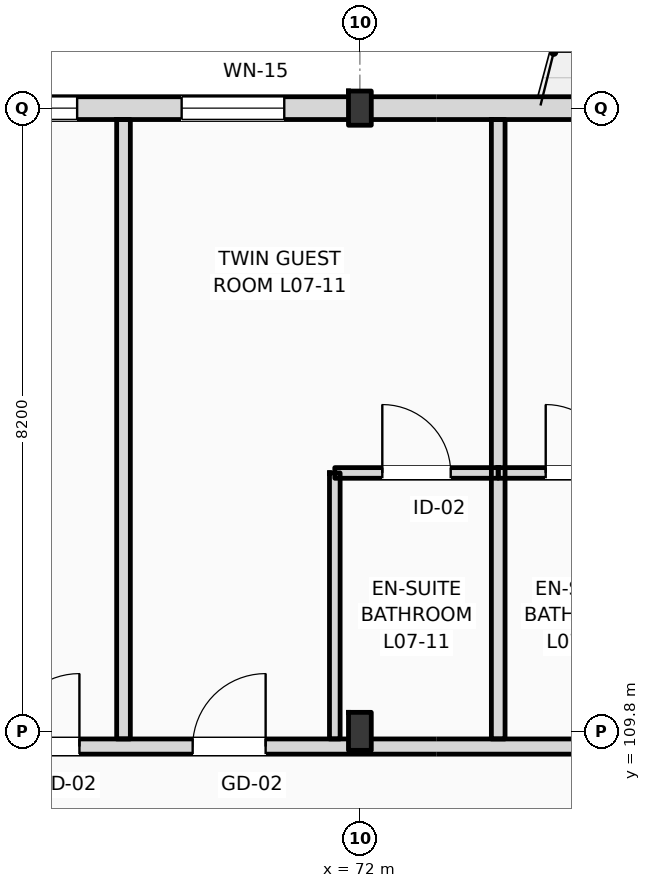
"""IFC4 building model, lengths in metres.
Left out: names, types, materials, properties, quantities, classifications, styles, units other than length and angle.
Written with IfcOpenShell. Run it as: python <this file> out.ifc"""

import sys

from ifc_helpers import new_model, si_unit, direction, frame, frame_2d, origin, origin_2d, place, context, subcontext, project, spatial, rectangle, i_section, extrude, element, fill, save


model = new_model("IFC4")
c1 = context("Model", 3, precision=1e-05, world=origin(), true_north=direction((0.0, 1.0)))
c2 = subcontext(c1, "Body", "Model", "MODEL_VIEW")
j1 = project(units=[si_unit("LENGTHUNIT", "METRE"), si_unit("PLANEANGLEUNIT", "RADIAN")], contexts=[c1])
p1 = place(None, origin())
s1 = spatial("IfcSite", under=j1, at=p1, CompositionType="ELEMENT")
p2 = place(p1, origin())
s2 = spatial("IfcBuilding", under=s1, at=p2, CompositionType="ELEMENT")
p3 = place(p2, frame((0.0, 0.0, 31.8)))
s3 = spatial("IfcBuildingStorey", under=s2, at=p3, CompositionType="ELEMENT", Elevation=31.8)
p4 = place(p3, frame((72.0, 109.8, 0.0), z_axis=(0.0, 0.0, 1.0), x_axis=(1.0, 0.0, 0.0)))
e1 = element("IfcColumn", 1, at=p4, inside=s3, PredefinedType="COLUMN", context=c2, shape_type="SweptSolid", body=[
    extrude(i_section(OverallWidth=0.3, OverallDepth=0.5, WebThickness=0.014, FlangeThickness=0.028, FilletRadius=0.027, at=origin_2d()), origin(), (0.0, 0.0, 1.0), 3.6),
])
p5 = place(p3, frame((72.0, 118.0, 0.0), z_axis=(0.0, 0.0, 1.0), x_axis=(1.0, 0.0, 0.0)))
e2 = element("IfcColumn", 2, at=p5, inside=s3, PredefinedType="COLUMN", context=c2, shape_type="SweptSolid", body=[
    extrude(i_section(OverallWidth=0.3, OverallDepth=0.45, WebThickness=0.014, FlangeThickness=0.026, FilletRadius=0.027, at=origin_2d()), origin(), (0.0, 0.0, 1.0), 3.6),
])
p6 = place(p3, frame((22.5, 118.0, 0.0), z_axis=(0.0, 0.0, 1.0), x_axis=(1.0, 0.0, 0.0)))
e3 = element("IfcWall", 3, at=p6, inside=s3, PredefinedType="STANDARD", context=c2, shape_type="SweptSolid", body=[
    extrude(rectangle(XDim=97.5, YDim=0.3, at=frame_2d((48.75, 0.0))), origin(), (0.0, 0.0, 1.0), 2.72),
])
p7 = place(p6, frame((3.61, 0.0, 0.9)))
e4 = element("IfcOpeningElement", 4, at=p7, cuts=e3, PredefinedType="OPENING", context=c2, shape_type="SweptSolid", body=[
    extrude(rectangle(XDim=1.1, YDim=1.64, at=frame_2d((0.55, 0.82))), frame((0.0, 0.16, 0.0), z_axis=(0.0, -1.0, 0.0), x_axis=(1.0, 0.0, 0.0)), (0.0, 0.0, 1.0), 0.32),
])
p8 = place(p6, frame((6.855, 0.0, 0.0)))
e5 = element("IfcOpeningElement", 5, at=p8, cuts=e3, PredefinedType="OPENING", context=c2, shape_type="SweptSolid", body=[
    extrude(rectangle(XDim=1.2, YDim=2.25, at=frame_2d((0.6, 1.125))), frame((0.0, 0.16, 0.0), z_axis=(0.0, -1.0, 0.0), x_axis=(1.0, 0.0, 0.0)), (0.0, 0.0, 1.0), 0.32),
])
p9 = place(p6, frame((11.405, 0.0, 0.9)))
e6 = element("IfcOpeningElement", 6, at=p9, cuts=e3, PredefinedType="OPENING", context=c2, shape_type="SweptSolid", body=[
    extrude(rectangle(XDim=2.1, YDim=1.64, at=frame_2d((1.05, 0.82))), frame((0.0, 0.16, 0.0), z_axis=(0.0, -1.0, 0.0), x_axis=(1.0, 0.0, 0.0)), (0.0, 0.0, 1.0), 0.32),
])
p10 = place(p6, frame((15.13, 0.0, 0.9)))
e7 = element("IfcOpeningElement", 7, at=p10, cuts=e3, PredefinedType="OPENING", context=c2, shape_type="SweptSolid", body=[
    extrude(rectangle(XDim=2.25, YDim=1.64, at=frame_2d((1.125, 0.82))), frame((0.0, 0.16, 0.0), z_axis=(0.0, -1.0, 0.0), x_axis=(1.0, 0.0, 0.0)), (0.0, 0.0, 1.0), 0.32),
])
p11 = place(p6, frame((21.53, 0.0, 0.0)))
e8 = element("IfcOpeningElement", 8, at=p11, cuts=e3, PredefinedType="OPENING", context=c2, shape_type="SweptSolid", body=[
    extrude(rectangle(XDim=1.2, YDim=2.25, at=frame_2d((0.6, 1.125))), frame((0.0, 0.16, 0.0), z_axis=(0.0, -1.0, 0.0), x_axis=(1.0, 0.0, 0.0)), (0.0, 0.0, 1.0), 0.32),
])
p12 = place(p6, frame((24.18, 0.0, 0.9)))
e9 = element("IfcOpeningElement", 9, at=p12, cuts=e3, PredefinedType="OPENING", context=c2, shape_type="SweptSolid", body=[
    extrude(rectangle(XDim=1.1, YDim=1.64, at=frame_2d((0.55, 0.82))), frame((0.0, 0.16, 0.0), z_axis=(0.0, -1.0, 0.0), x_axis=(1.0, 0.0, 0.0)), (0.0, 0.0, 1.0), 0.32),
])
p13 = place(p6, frame((29.105, 0.0, 0.9)))
e10 = element("IfcOpeningElement", 10, at=p13, cuts=e3, PredefinedType="OPENING", context=c2, shape_type="SweptSolid", body=[
    extrude(rectangle(XDim=2.7, YDim=1.64, at=frame_2d((1.35, 0.82))), frame((0.0, 0.16, 0.0), z_axis=(0.0, -1.0, 0.0), x_axis=(1.0, 0.0, 0.0)), (0.0, 0.0, 1.0), 0.32),
])
p14 = place(p6, frame((34.83, 0.0, 0.9)))
e11 = element("IfcOpeningElement", 11, at=p14, cuts=e3, PredefinedType="OPENING", context=c2, shape_type="SweptSolid", body=[
    extrude(rectangle(XDim=1.8, YDim=1.64, at=frame_2d((0.9, 0.82))), frame((0.0, 0.16, 0.0), z_axis=(0.0, -1.0, 0.0), x_axis=(1.0, 0.0, 0.0)), (0.0, 0.0, 1.0), 0.32),
])
p15 = place(p6, frame((38.525, 0.0, 0.0)))
e12 = element("IfcOpeningElement", 12, at=p15, cuts=e3, PredefinedType="OPENING", context=c2, shape_type="SweptSolid", body=[
    extrude(rectangle(XDim=1.2, YDim=2.25, at=frame_2d((0.6, 1.125))), frame((0.0, 0.16, 0.0), z_axis=(0.0, -1.0, 0.0), x_axis=(1.0, 0.0, 0.0)), (0.0, 0.0, 1.0), 0.32),
])
p16 = place(p6, frame((42.73, 0.0, 0.9)))
e13 = element("IfcOpeningElement", 13, at=p16, cuts=e3, PredefinedType="OPENING", context=c2, shape_type="SweptSolid", body=[
    extrude(rectangle(XDim=3.05, YDim=1.64, at=frame_2d((1.525, 0.82))), frame((0.0, 0.16, 0.0), z_axis=(0.0, -1.0, 0.0), x_axis=(1.0, 0.0, 0.0)), (0.0, 0.0, 1.0), 0.32),
])
p17 = place(p6, frame((47.155, 0.0, 0.9)))
e14 = element("IfcOpeningElement", 14, at=p17, cuts=e3, PredefinedType="OPENING", context=c2, shape_type="SweptSolid", body=[
    extrude(rectangle(XDim=1.35, YDim=1.64, at=frame_2d((0.675, 0.82))), frame((0.0, 0.16, 0.0), z_axis=(0.0, -1.0, 0.0), x_axis=(1.0, 0.0, 0.0)), (0.0, 0.0, 1.0), 0.32),
])
p18 = place(p6, frame((53.065, 0.0, 0.0)))
e15 = element("IfcOpeningElement", 15, at=p18, cuts=e3, PredefinedType="OPENING", context=c2, shape_type="SweptSolid", body=[
    extrude(rectangle(XDim=1.2, YDim=2.25, at=frame_2d((0.6, 1.125))), frame((0.0, 0.16, 0.0), z_axis=(0.0, -1.0, 0.0), x_axis=(1.0, 0.0, 0.0)), (0.0, 0.0, 1.0), 0.32),
])
p19 = place(p6, frame((58.2, 0.0, 0.9)))
e16 = element("IfcOpeningElement", 16, at=p19, cuts=e3, PredefinedType="OPENING", context=c2, shape_type="SweptSolid", body=[
    extrude(rectangle(XDim=1.8, YDim=1.64, at=frame_2d((0.9, 0.82))), frame((0.0, 0.16, 0.0), z_axis=(0.0, -1.0, 0.0), x_axis=(1.0, 0.0, 0.0)), (0.0, 0.0, 1.0), 0.32),
])
p20 = place(p6, frame((61.13, 0.0, 0.9)))
e17 = element("IfcOpeningElement", 17, at=p20, cuts=e3, PredefinedType="OPENING", context=c2, shape_type="SweptSolid", body=[
    extrude(rectangle(XDim=3.05, YDim=1.64, at=frame_2d((1.525, 0.82))), frame((0.0, 0.16, 0.0), z_axis=(0.0, -1.0, 0.0), x_axis=(1.0, 0.0, 0.0)), (0.0, 0.0, 1.0), 0.32),
])
p21 = place(p6, frame((67.93, 0.0, 0.0)))
e18 = element("IfcOpeningElement", 18, at=p21, cuts=e3, PredefinedType="OPENING", context=c2, shape_type="SweptSolid", body=[
    extrude(rectangle(XDim=1.2, YDim=2.25, at=frame_2d((0.6, 1.125))), frame((0.0, 0.16, 0.0), z_axis=(0.0, -1.0, 0.0), x_axis=(1.0, 0.0, 0.0)), (0.0, 0.0, 1.0), 0.32),
])
p22 = place(p6, frame((70.39, 0.0, 0.0)))
e19 = element("IfcOpeningElement", 19, at=p22, cuts=e3, PredefinedType="OPENING", context=c2, shape_type="SweptSolid", body=[
    extrude(rectangle(XDim=1.2, YDim=2.25, at=frame_2d((0.6, 1.125))), frame((0.0, 0.16, 0.0), z_axis=(0.0, -1.0, 0.0), x_axis=(1.0, 0.0, 0.0)), (0.0, 0.0, 1.0), 0.32),
])
p23 = place(p6, frame((75.905, 0.0, 0.9)))
e20 = element("IfcOpeningElement", 20, at=p23, cuts=e3, PredefinedType="OPENING", context=c2, shape_type="SweptSolid", body=[
    extrude(rectangle(XDim=1.1, YDim=1.5, at=frame_2d((0.55, 0.75))), frame((0.0, 0.16, 0.0), z_axis=(0.0, -1.0, 0.0), x_axis=(1.0, 0.0, 0.0)), (0.0, 0.0, 1.0), 0.32),
])
p24 = place(p6, frame((81.63, 0.0, 0.9)))
e21 = element("IfcOpeningElement", 21, at=p24, cuts=e3, PredefinedType="OPENING", context=c2, shape_type="SweptSolid", body=[
    extrude(rectangle(XDim=1.1, YDim=1.6, at=frame_2d((0.55, 0.8))), frame((0.0, 0.16, 0.0), z_axis=(0.0, -1.0, 0.0), x_axis=(1.0, 0.0, 0.0)), (0.0, 0.0, 1.0), 0.32),
])
p25 = place(p6, frame((84.955, 0.0, 0.9)))
e22 = element("IfcOpeningElement", 22, at=p25, cuts=e3, PredefinedType="OPENING", context=c2, shape_type="SweptSolid", body=[
    extrude(rectangle(XDim=1.4, YDim=1.64, at=frame_2d((0.7, 0.82))), frame((0.0, 0.16, 0.0), z_axis=(0.0, -1.0, 0.0), x_axis=(1.0, 0.0, 0.0)), (0.0, 0.0, 1.0), 0.32),
])
p26 = place(p6, frame((90.055, 0.0, 0.9)))
e23 = element("IfcOpeningElement", 23, at=p26, cuts=e3, PredefinedType="OPENING", context=c2, shape_type="SweptSolid", body=[
    extrude(rectangle(XDim=1.6, YDim=1.64, at=frame_2d((0.8, 0.82))), frame((0.0, 0.16, 0.0), z_axis=(0.0, -1.0, 0.0), x_axis=(1.0, 0.0, 0.0)), (0.0, 0.0, 1.0), 0.32),
])
p27 = place(p6, frame((93.87, 0.0, 0.9)))
e24 = element("IfcOpeningElement", 24, at=p27, cuts=e3, PredefinedType="OPENING", context=c2, shape_type="SweptSolid", body=[
    extrude(rectangle(XDim=1.75, YDim=1.64, at=frame_2d((0.875, 0.82))), frame((0.0, 0.16, 0.0), z_axis=(0.0, -1.0, 0.0), x_axis=(1.0, 0.0, 0.0)), (0.0, 0.0, 1.0), 0.32),
])
p28 = place(p3, frame((10.65, 109.6, 0.0), z_axis=(0.0, 0.0, 1.0), x_axis=(1.0, 0.0, 0.0)))
e25 = element("IfcWall", 25, at=p28, inside=s3, PredefinedType="PARTITIONING", context=c2, shape_type="SweptSolid", body=[
    extrude(rectangle(XDim=109.21, YDim=0.2, at=frame_2d((54.605, 0.0))), origin(), (0.0, 0.0, 1.0), 2.72),
])
p29 = place(p28, frame((15.825, 0.0, 0.0)))
e26 = element("IfcOpeningElement", 26, at=p29, cuts=e25, PredefinedType="OPENING", context=c2, shape_type="SweptSolid", body=[
    extrude(rectangle(XDim=1.02, YDim=2.2, at=frame_2d((0.51, 1.1))), frame((0.0, 0.11, 0.0), z_axis=(0.0, -1.0, 0.0), x_axis=(1.0, 0.0, 0.0)), (0.0, 0.0, 1.0), 0.22),
])
p30 = place(p28, frame((19.87, 0.0, 0.0)))
e27 = element("IfcOpeningElement", 27, at=p30, cuts=e25, PredefinedType="OPENING", context=c2, shape_type="SweptSolid", body=[
    extrude(rectangle(XDim=1.02, YDim=2.2, at=frame_2d((0.51, 1.1))), frame((0.0, 0.11, 0.0), z_axis=(0.0, -1.0, 0.0), x_axis=(1.0, 0.0, 0.0)), (0.0, 0.0, 1.0), 0.22),
])
p31 = place(p28, frame((24.47, 0.0, 0.0)))
e28 = element("IfcOpeningElement", 28, at=p31, cuts=e25, PredefinedType="OPENING", context=c2, shape_type="SweptSolid", body=[
    extrude(rectangle(XDim=1.02, YDim=2.2, at=frame_2d((0.51, 1.1))), frame((0.0, 0.11, 0.0), z_axis=(0.0, -1.0, 0.0), x_axis=(1.0, 0.0, 0.0)), (0.0, 0.0, 1.0), 0.22),
])
p32 = place(p28, frame((26.92, 0.0, 0.0)))
e29 = element("IfcOpeningElement", 29, at=p32, cuts=e25, PredefinedType="OPENING", context=c2, shape_type="SweptSolid", body=[
    extrude(rectangle(XDim=1.02, YDim=2.2, at=frame_2d((0.51, 1.1))), frame((0.0, 0.11, 0.0), z_axis=(0.0, -1.0, 0.0), x_axis=(1.0, 0.0, 0.0)), (0.0, 0.0, 1.0), 0.22),
])
p33 = place(p28, frame((33.7, 0.0, 0.0)))
e30 = element("IfcOpeningElement", 30, at=p33, cuts=e25, PredefinedType="OPENING", context=c2, shape_type="SweptSolid", body=[
    extrude(rectangle(XDim=0.96, YDim=2.2, at=frame_2d((0.48, 1.1))), frame((0.0, 0.11, 0.0), z_axis=(0.0, -1.0, 0.0), x_axis=(1.0, 0.0, 0.0)), (0.0, 0.0, 1.0), 0.22),
])
p34 = place(p28, frame((35.9, 0.0, 0.0)))
e31 = element("IfcOpeningElement", 31, at=p34, cuts=e25, PredefinedType="OPENING", context=c2, shape_type="SweptSolid", body=[
    extrude(rectangle(XDim=0.96, YDim=2.2, at=frame_2d((0.48, 1.1))), frame((0.0, 0.11, 0.0), z_axis=(0.0, -1.0, 0.0), x_axis=(1.0, 0.0, 0.0)), (0.0, 0.0, 1.0), 0.22),
])
p35 = place(p28, frame((42.9, 0.0, 0.0)))
e32 = element("IfcOpeningElement", 32, at=p35, cuts=e25, PredefinedType="OPENING", context=c2, shape_type="SweptSolid", body=[
    extrude(rectangle(XDim=0.96, YDim=2.2, at=frame_2d((0.48, 1.1))), frame((0.0, 0.11, 0.0), z_axis=(0.0, -1.0, 0.0), x_axis=(1.0, 0.0, 0.0)), (0.0, 0.0, 1.0), 0.22),
])
p36 = place(p28, frame((47.5, 0.0, 0.0)))
e33 = element("IfcOpeningElement", 33, at=p36, cuts=e25, PredefinedType="OPENING", context=c2, shape_type="SweptSolid", body=[
    extrude(rectangle(XDim=0.96, YDim=2.2, at=frame_2d((0.48, 1.1))), frame((0.0, 0.11, 0.0), z_axis=(0.0, -1.0, 0.0), x_axis=(1.0, 0.0, 0.0)), (0.0, 0.0, 1.0), 0.22),
])
p37 = place(p28, frame((49.95, 0.0, 0.0)))
e34 = element("IfcOpeningElement", 34, at=p37, cuts=e25, PredefinedType="OPENING", context=c2, shape_type="SweptSolid", body=[
    extrude(rectangle(XDim=0.96, YDim=2.2, at=frame_2d((0.48, 1.1))), frame((0.0, 0.11, 0.0), z_axis=(0.0, -1.0, 0.0), x_axis=(1.0, 0.0, 0.0)), (0.0, 0.0, 1.0), 0.22),
])
p38 = place(p28, frame((56.7, 0.0, 0.0)))
e35 = element("IfcOpeningElement", 35, at=p38, cuts=e25, PredefinedType="OPENING", context=c2, shape_type="SweptSolid", body=[
    extrude(rectangle(XDim=0.96, YDim=2.2, at=frame_2d((0.48, 1.1))), frame((0.0, 0.11, 0.0), z_axis=(0.0, -1.0, 0.0), x_axis=(1.0, 0.0, 0.0)), (0.0, 0.0, 1.0), 0.22),
])
p39 = place(p28, frame((59.15, 0.0, 0.0)))
e36 = element("IfcOpeningElement", 36, at=p39, cuts=e25, PredefinedType="OPENING", context=c2, shape_type="SweptSolid", body=[
    extrude(rectangle(XDim=0.96, YDim=2.2, at=frame_2d((0.48, 1.1))), frame((0.0, 0.11, 0.0), z_axis=(0.0, -1.0, 0.0), x_axis=(1.0, 0.0, 0.0)), (0.0, 0.0, 1.0), 0.22),
])
p40 = place(p28, frame((65.9, 0.0, 0.0)))
e37 = element("IfcOpeningElement", 37, at=p40, cuts=e25, PredefinedType="OPENING", context=c2, shape_type="SweptSolid", body=[
    extrude(rectangle(XDim=0.96, YDim=2.2, at=frame_2d((0.48, 1.1))), frame((0.0, 0.11, 0.0), z_axis=(0.0, -1.0, 0.0), x_axis=(1.0, 0.0, 0.0)), (0.0, 0.0, 1.0), 0.22),
])
p41 = place(p28, frame((70.5, 0.0, 0.0)))
e38 = element("IfcOpeningElement", 38, at=p41, cuts=e25, PredefinedType="OPENING", context=c2, shape_type="SweptSolid", body=[
    extrude(rectangle(XDim=0.96, YDim=2.2, at=frame_2d((0.48, 1.1))), frame((0.0, 0.11, 0.0), z_axis=(0.0, -1.0, 0.0), x_axis=(1.0, 0.0, 0.0)), (0.0, 0.0, 1.0), 0.22),
])
p42 = place(p28, frame((72.95, 0.0, 0.0)))
e39 = element("IfcOpeningElement", 39, at=p42, cuts=e25, PredefinedType="OPENING", context=c2, shape_type="SweptSolid", body=[
    extrude(rectangle(XDim=0.96, YDim=2.2, at=frame_2d((0.48, 1.1))), frame((0.0, 0.11, 0.0), z_axis=(0.0, -1.0, 0.0), x_axis=(1.0, 0.0, 0.0)), (0.0, 0.0, 1.0), 0.22),
])
p43 = place(p28, frame((79.7, 0.0, 0.0)))
e40 = element("IfcOpeningElement", 40, at=p43, cuts=e25, PredefinedType="OPENING", context=c2, shape_type="SweptSolid", body=[
    extrude(rectangle(XDim=0.96, YDim=2.2, at=frame_2d((0.48, 1.1))), frame((0.0, 0.11, 0.0), z_axis=(0.0, -1.0, 0.0), x_axis=(1.0, 0.0, 0.0)), (0.0, 0.0, 1.0), 0.22),
])
p44 = place(p28, frame((82.15, 0.0, 0.0)))
e41 = element("IfcOpeningElement", 41, at=p44, cuts=e25, PredefinedType="OPENING", context=c2, shape_type="SweptSolid", body=[
    extrude(rectangle(XDim=0.96, YDim=2.2, at=frame_2d((0.48, 1.1))), frame((0.0, 0.11, 0.0), z_axis=(0.0, -1.0, 0.0), x_axis=(1.0, 0.0, 0.0)), (0.0, 0.0, 1.0), 0.22),
])
p45 = place(p28, frame((88.9, 0.0, 0.0)))
e42 = element("IfcOpeningElement", 42, at=p45, cuts=e25, PredefinedType="OPENING", context=c2, shape_type="SweptSolid", body=[
    extrude(rectangle(XDim=0.96, YDim=2.2, at=frame_2d((0.48, 1.1))), frame((0.0, 0.11, 0.0), z_axis=(0.0, -1.0, 0.0), x_axis=(1.0, 0.0, 0.0)), (0.0, 0.0, 1.0), 0.22),
])
p46 = place(p28, frame((93.75, 0.0, 0.0)))
e43 = element("IfcOpeningElement", 43, at=p46, cuts=e25, PredefinedType="OPENING", context=c2, shape_type="SweptSolid", body=[
    extrude(rectangle(XDim=0.96, YDim=2.2, at=frame_2d((0.48, 1.1))), frame((0.0, 0.11, 0.0), z_axis=(0.0, -1.0, 0.0), x_axis=(1.0, 0.0, 0.0)), (0.0, 0.0, 1.0), 0.22),
])
p47 = place(p28, frame((98.1, 0.0, 0.0)))
e44 = element("IfcOpeningElement", 44, at=p47, cuts=e25, PredefinedType="OPENING", context=c2, shape_type="SweptSolid", body=[
    extrude(rectangle(XDim=0.96, YDim=2.2, at=frame_2d((0.48, 1.1))), frame((0.0, 0.11, 0.0), z_axis=(0.0, -1.0, 0.0), x_axis=(1.0, 0.0, 0.0)), (0.0, 0.0, 1.0), 0.22),
])
p48 = place(p28, frame((102.7, 0.0, 0.0)))
e45 = element("IfcOpeningElement", 45, at=p48, cuts=e25, PredefinedType="OPENING", context=c2, shape_type="SweptSolid", body=[
    extrude(rectangle(XDim=0.96, YDim=2.2, at=frame_2d((0.48, 1.1))), frame((0.0, 0.11, 0.0), z_axis=(0.0, -1.0, 0.0), x_axis=(1.0, 0.0, 0.0)), (0.0, 0.0, 1.0), 0.22),
])
p49 = place(p28, frame((105.04, 0.0, 0.0)))
e46 = element("IfcOpeningElement", 46, at=p49, cuts=e25, PredefinedType="OPENING", context=c2, shape_type="SweptSolid", body=[
    extrude(rectangle(XDim=0.96, YDim=2.2, at=frame_2d((0.48, 1.1))), frame((0.0, 0.11, 0.0), z_axis=(0.0, -1.0, 0.0), x_axis=(1.0, 0.0, 0.0)), (0.0, 0.0, 1.0), 0.22),
])
p50 = place(p28, frame((2.716, 0.0, 0.0)))
e47 = element("IfcOpeningElement", 47, at=p50, cuts=e25, PredefinedType="OPENING", context=c2, shape_type="SweptSolid", body=[
    extrude(rectangle(XDim=1.35, YDim=2.25, at=frame_2d((0.675, 1.125))), frame((0.0, 0.11, 0.0), z_axis=(0.0, -1.0, 0.0), x_axis=(1.0, 0.0, 0.0)), (0.0, 0.0, 1.0), 0.22),
])
p51 = place(p28, frame((6.65, 0.0, 0.0)))
e48 = element("IfcOpeningElement", 48, at=p51, cuts=e25, PredefinedType="OPENING", context=c2, shape_type="SweptSolid", body=[
    extrude(rectangle(XDim=1.35, YDim=2.25, at=frame_2d((0.675, 1.125))), frame((0.0, 0.11, 0.0), z_axis=(0.0, -1.0, 0.0), x_axis=(1.0, 0.0, 0.0)), (0.0, 0.0, 1.0), 0.22),
])
p52 = place(p28, frame((10.583, 0.0, 0.0)))
e49 = element("IfcOpeningElement", 49, at=p52, cuts=e25, PredefinedType="OPENING", context=c2, shape_type="SweptSolid", body=[
    extrude(rectangle(XDim=1.35, YDim=2.25, at=frame_2d((0.675, 1.125))), frame((0.0, 0.11, 0.0), z_axis=(0.0, -1.0, 0.0), x_axis=(1.0, 0.0, 0.0)), (0.0, 0.0, 1.0), 0.22),
])
for number, where, z_axis, x_axis in (
    (50, (68.89, 109.7, 0.0), (0.0, 0.0, 1.0), (0.0, 1.0, 0.0)),
    (51, (73.82, 109.7, 0.0), (0.0, 0.0, 1.0), (0.0, 1.0, 0.0)),
):
    element("IfcWall", number, at=place(p3, frame(where, z_axis=z_axis, x_axis=x_axis)), inside=s3, PredefinedType="PARTITIONING", context=c2, shape_type="SweptSolid", body=[
        extrude(rectangle(XDim=8.15, YDim=0.18, at=frame_2d((4.075, 0.0))), origin(), (0.0, 0.0, 1.0), 3.36),
    ])
p53 = place(p3, frame((71.67, 109.7, 0.0), z_axis=(0.0, 0.0, 1.0), x_axis=(0.0, 1.0, 0.0)))
e52 = element("IfcWall", 52, at=p53, inside=s3, PredefinedType="PARTITIONING", context=c2, shape_type="SweptSolid", body=[
    extrude(rectangle(XDim=3.5, YDim=0.14, at=frame_2d((1.75, 0.0))), origin(), (0.0, 0.0, 1.0), 3.36),
])
p54 = place(p3, frame((71.67, 113.2, 0.0), z_axis=(0.0, 0.0, 1.0), x_axis=(1.0, 0.0, 0.0)))
e53 = element("IfcWall", 53, at=p54, inside=s3, PredefinedType="PARTITIONING", context=c2, shape_type="SweptSolid", body=[
    extrude(rectangle(XDim=2.15, YDim=0.14, at=frame_2d((1.075, 0.0))), origin(), (0.0, 0.0, 1.0), 3.36),
])
p55 = place(p54, frame((0.625, 0.0, 0.0)))
e54 = element("IfcOpeningElement", 54, at=p55, cuts=e53, PredefinedType="OPENING", context=c2, shape_type="SweptSolid", body=[
    extrude(rectangle(XDim=0.9, YDim=2.1, at=frame_2d((0.45, 1.05))), frame((0.0, 0.08, 0.0), z_axis=(0.0, -1.0, 0.0), x_axis=(1.0, 0.0, 0.0)), (0.0, 0.0, 1.0), 0.16),
])
p56 = place(p3, frame((73.82, 113.2, 0.0), z_axis=(0.0, 0.0, 1.0), x_axis=(1.0, 0.0, 0.0)))
e55 = element("IfcWall", 55, at=p56, inside=s3, PredefinedType="PARTITIONING", context=c2, shape_type="SweptSolid", body=[
    extrude(rectangle(XDim=2.15, YDim=0.14, at=frame_2d((1.075, 0.0))), origin(), (0.0, 0.0, 1.0), 3.36),
])
p57 = place(p56, frame((0.625, 0.0, 0.0)))
e56 = element("IfcOpeningElement", 56, at=p57, cuts=e55, PredefinedType="OPENING", context=c2, shape_type="SweptSolid", body=[
    extrude(rectangle(XDim=0.9, YDim=2.1, at=frame_2d((0.45, 1.05))), frame((0.0, 0.08, 0.0), z_axis=(0.0, -1.0, 0.0), x_axis=(1.0, 0.0, 0.0)), (0.0, 0.0, 1.0), 0.16),
])
p58 = place(p16, origin())
e57 = element("IfcWindow", 57, at=p58, inside=s3, PartitioningType="DOUBLE_PANEL_VERTICAL", PredefinedType="WINDOW", context=c2, shape_type="SweptSolid", body=[
    extrude(rectangle(XDim=3.05, YDim=1.64, at=frame_2d((1.525, 0.82))), frame((0.0, 0.03, 0.0), z_axis=(0.0, -1.0, 0.0), x_axis=(1.0, 0.0, 0.0)), (0.0, 0.0, 1.0), 0.06),
])
fill(e13, e57)
p59 = place(p17, origin())
e58 = element("IfcWindow", 58, at=p59, inside=s3, PartitioningType="DOUBLE_PANEL_VERTICAL", PredefinedType="WINDOW", context=c2, shape_type="SweptSolid", body=[
    extrude(rectangle(XDim=1.35, YDim=1.64, at=frame_2d((0.675, 0.82))), frame((0.0, 0.03, 0.0), z_axis=(0.0, -1.0, 0.0), x_axis=(1.0, 0.0, 0.0)), (0.0, 0.0, 1.0), 0.06),
])
fill(e14, e58)
p60 = place(p38, origin())
e59 = element("IfcDoor", 59, at=p60, inside=s3, OperationType="SINGLE_SWING_RIGHT", PredefinedType="DOOR", context=c2, shape_type="SweptSolid", body=[
    extrude(rectangle(XDim=0.96, YDim=2.2, at=frame_2d((0.48, 1.1))), frame((0.0, 0.025, 0.0), z_axis=(0.0, -1.0, 0.0), x_axis=(1.0, 0.0, 0.0)), (0.0, 0.0, 1.0), 0.05),
])
fill(e35, e59)
p61 = place(p39, origin())
e60 = element("IfcDoor", 60, at=p61, inside=s3, OperationType="SINGLE_SWING_RIGHT", PredefinedType="DOOR", context=c2, shape_type="SweptSolid", body=[
    extrude(rectangle(XDim=0.96, YDim=2.2, at=frame_2d((0.48, 1.1))), frame((0.0, 0.025, 0.0), z_axis=(0.0, -1.0, 0.0), x_axis=(1.0, 0.0, 0.0)), (0.0, 0.0, 1.0), 0.05),
])
fill(e36, e60)
p62 = place(p55, origin())
e61 = element("IfcDoor", 61, at=p62, inside=s3, OperationType="SINGLE_SWING_LEFT", PredefinedType="DOOR", context=c2, shape_type="SweptSolid", body=[
    extrude(rectangle(XDim=0.9, YDim=2.1, at=frame_2d((0.45, 1.05))), frame((0.0, 0.025, 0.0), z_axis=(0.0, -1.0, 0.0), x_axis=(1.0, 0.0, 0.0)), (0.0, 0.0, 1.0), 0.05),
])
fill(e54, e61)
p63 = place(p57, origin())
e62 = element("IfcDoor", 62, at=p63, inside=s3, OperationType="SINGLE_SWING_LEFT", PredefinedType="DOOR", context=c2, shape_type="SweptSolid", body=[
    extrude(rectangle(XDim=0.9, YDim=2.1, at=frame_2d((0.45, 1.05))), frame((0.0, 0.025, 0.0), z_axis=(0.0, -1.0, 0.0), x_axis=(1.0, 0.0, 0.0)), (0.0, 0.0, 1.0), 0.05),
])
fill(e56, e62)
save(model, sys.argv[1])
